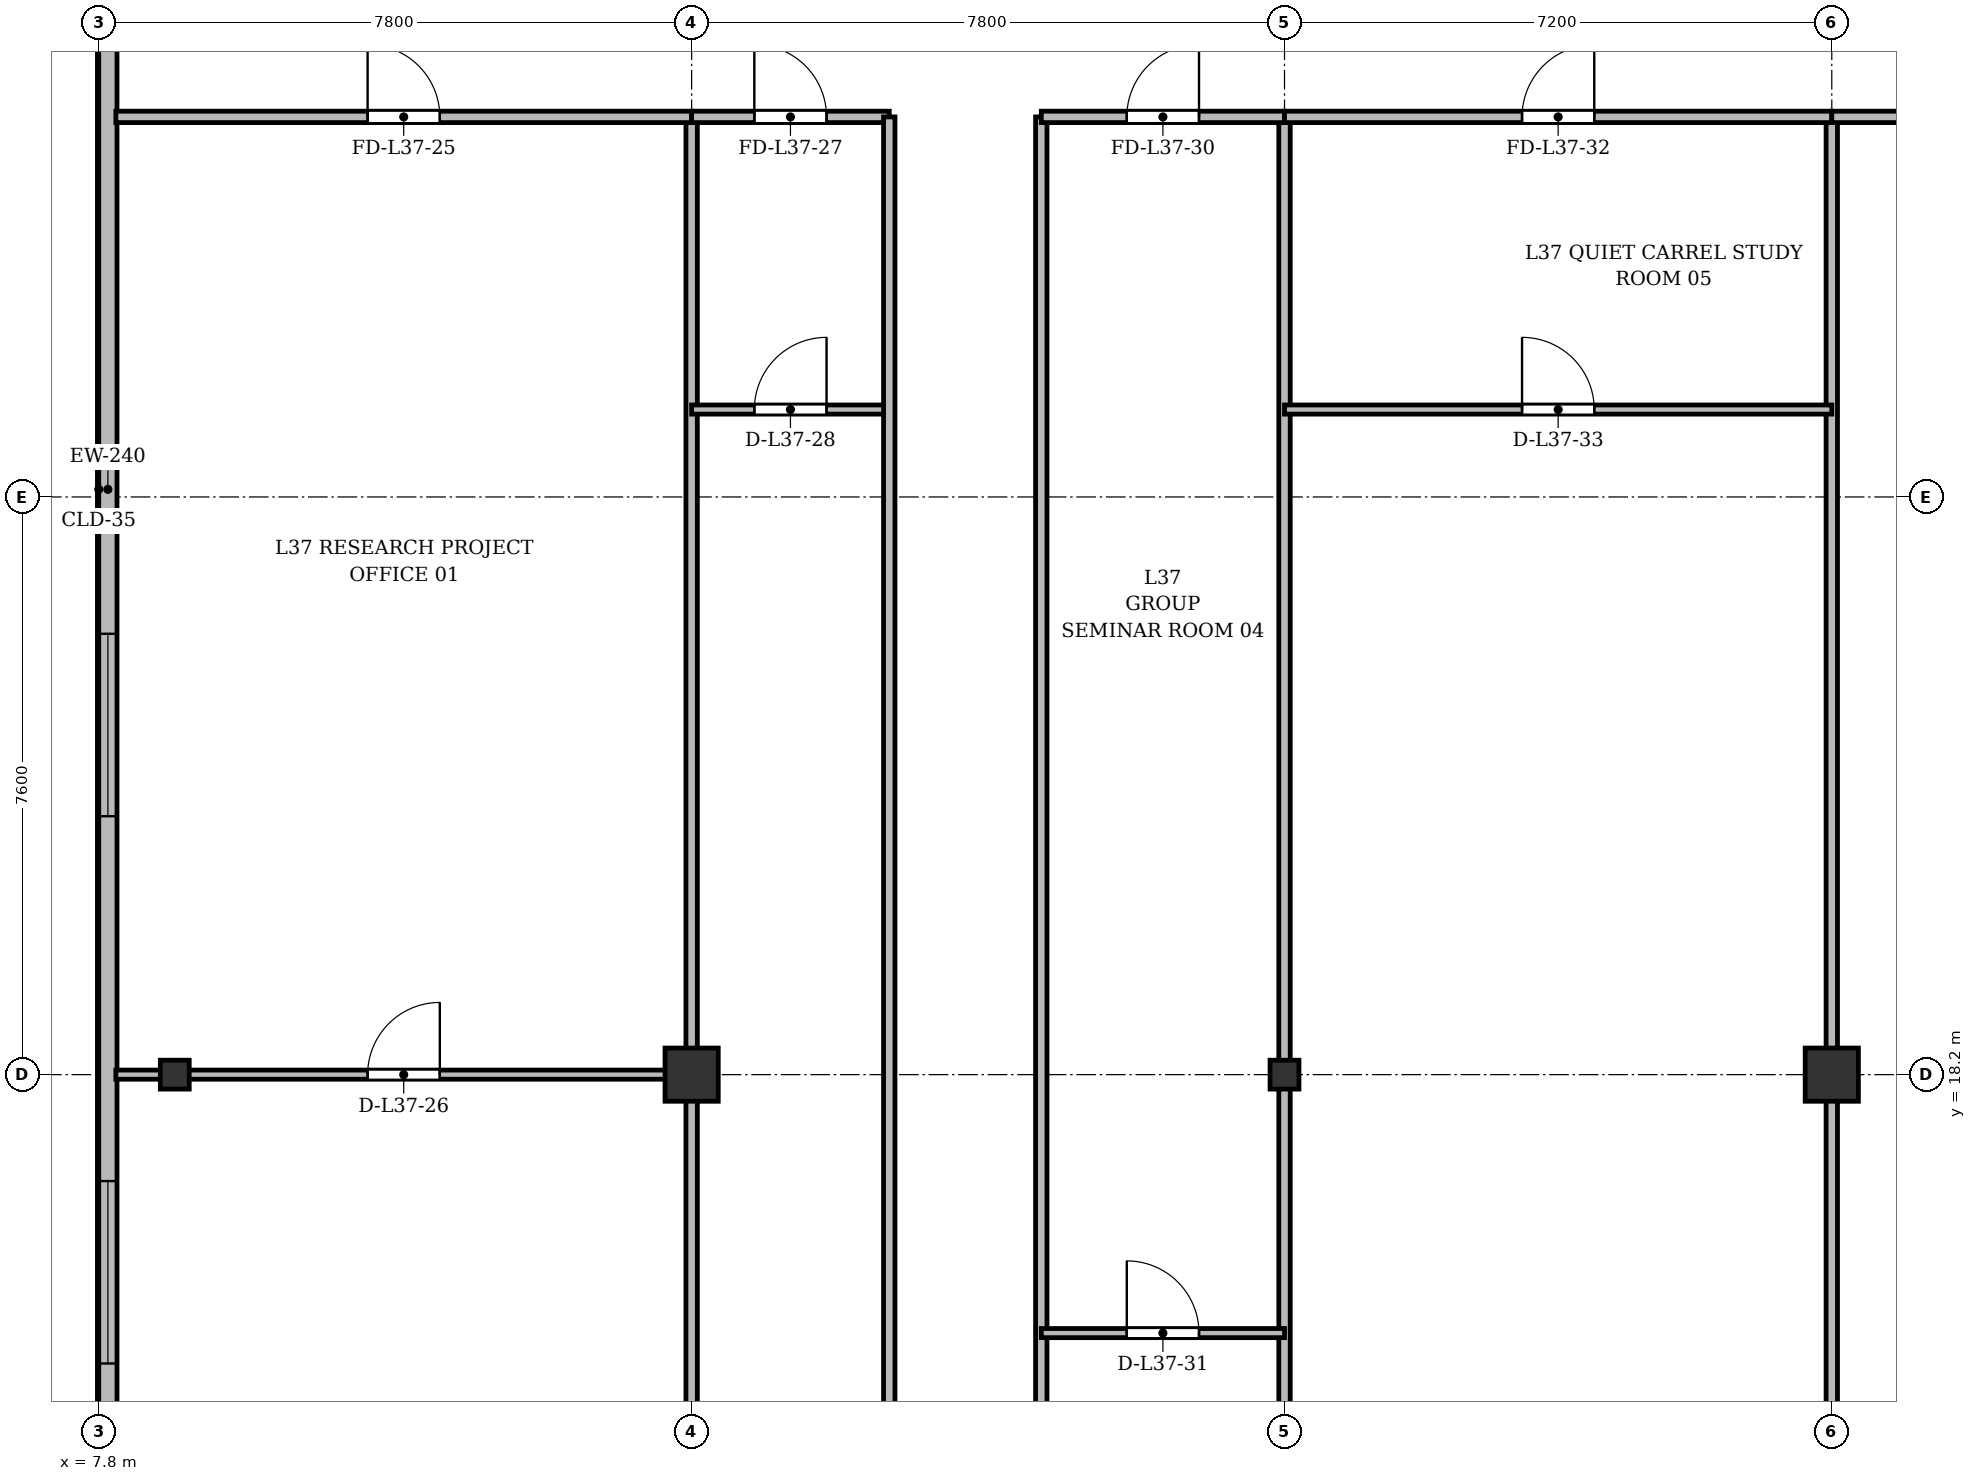
"""IFC4 building model, lengths in metres.
Left out: names, types, materials, properties, quantities, classifications, styles, units other than length and angle.
Written with IfcOpenShell. Run it as: python <this file> out.ifc"""

import sys

from ifc_helpers import new_model, si_unit, direction, frame, frame_2d, origin, origin_2d, place, context, subcontext, project, spatial, rectangle, i_section, extrude, source, transform, mapped, element, fill, save


model = new_model("IFC4")
c1 = context("Model", 3, precision=1e-05, world=origin(), true_north=direction((0.0, 1.0)))
c2 = subcontext(c1, "Body", "Model", "MODEL_VIEW")
j1 = project(units=[si_unit("LENGTHUNIT", "METRE"), si_unit("PLANEANGLEUNIT", "RADIAN")], contexts=[c1])
p1 = place(None, origin())
s1 = spatial("IfcSite", under=j1, at=p1, CompositionType="ELEMENT")
p2 = place(p1, origin())
s2 = spatial("IfcBuilding", under=s1, at=p2, CompositionType="ELEMENT")
p3 = place(p2, frame((0.0, 0.0, 142.9)))
s3 = spatial("IfcBuildingStorey", under=s2, at=p3, CompositionType="ELEMENT", Elevation=142.9)
m1 = source(origin(), c2, "Body", "SweptSolid", [
    extrude(i_section(OverallWidth=0.38, OverallDepth=0.38, WebThickness=0.02, FlangeThickness=0.03, at=origin_2d()), origin(), (0.0, 0.0, 1.0), 3.6),
])
p4 = place(p3, frame((8.8, 18.2, 0.0), z_axis=(0.0, 0.0, 1.0), x_axis=(1.0, 0.0, 0.0)))
e1 = element("IfcColumn", 1, at=p4, inside=s3, PredefinedType="COLUMN", context=c2, shape_type="MappedRepresentation", body=[
    mapped(m1, transform((0.0, 0.0, 0.0), x_axis=(1.0, 0.0, 0.0), y_axis=(0.0, 1.0, 0.0), z_axis=(0.0, 0.0, 1.0), scale=1.0)),
])
m2 = source(origin(), c2, "Body", "SweptSolid", [
    extrude(rectangle(XDim=0.7, YDim=0.7, at=origin_2d()), origin(), (0.0, 0.0, 1.0), 3.6),
])
p5 = place(p3, frame((15.6, 18.2, 0.0), z_axis=(0.0, 0.0, 1.0), x_axis=(1.0, 0.0, 0.0)))
e2 = element("IfcColumn", 2, at=p5, inside=s3, PredefinedType="COLUMN", context=c2, shape_type="MappedRepresentation", body=[
    mapped(m2, transform((0.0, 0.0, 0.0), x_axis=(1.0, 0.0, 0.0), y_axis=(0.0, 1.0, 0.0), z_axis=(0.0, 0.0, 1.0), scale=1.0)),
])
p6 = place(p3, frame((23.4, 18.2, 0.0), z_axis=(0.0, 0.0, 1.0), x_axis=(1.0, 0.0, 0.0)))
e3 = element("IfcColumn", 3, at=p6, inside=s3, PredefinedType="COLUMN", context=c2, shape_type="MappedRepresentation", body=[
    mapped(m1, transform((0.0, 0.0, 0.0), x_axis=(1.0, 0.0, 0.0), y_axis=(0.0, 1.0, 0.0), z_axis=(0.0, 0.0, 1.0), scale=1.0)),
])
p7 = place(p3, frame((30.6, 18.2, 0.0), z_axis=(0.0, 0.0, 1.0), x_axis=(1.0, 0.0, 0.0)))
e4 = element("IfcColumn", 4, at=p7, inside=s3, PredefinedType="COLUMN", context=c2, shape_type="MappedRepresentation", body=[
    mapped(m2, transform((0.0, 0.0, 0.0), x_axis=(1.0, 0.0, 0.0), y_axis=(0.0, 1.0, 0.0), z_axis=(0.0, 0.0, 1.0), scale=1.0)),
])
p8 = place(p3, frame((7.92, 6.3, 0.0), z_axis=(0.0, 0.0, 1.0), x_axis=(0.0, 1.0, 0.0)))
e5 = element("IfcWall", 5, at=p8, inside=s3, PredefinedType="SOLIDWALL", context=c2, shape_type="SweptSolid", body=[
    extrude(rectangle(XDim=39.2, YDim=0.24, at=frame_2d((19.6, 0.0))), origin(), (0.0, 0.0, 1.0), 3.35),
])
p9 = place(p8, frame((1.45, 0.0, 0.92)))
e6 = element("IfcOpeningElement", 6, at=p9, cuts=e5, PredefinedType="OPENING", context=c2, shape_type="SweptSolid", body=[
    extrude(rectangle(XDim=1.2, YDim=1.65, at=frame_2d((0.6, 0.825))), frame((0.0, 0.13, 0.0), z_axis=(0.0, -1.0, 0.0), x_axis=(1.0, 0.0, 0.0)), (0.0, 0.0, 1.0), 0.26),
])
p10 = place(p8, frame((3.9, 0.0, 0.92)))
e7 = element("IfcOpeningElement", 7, at=p10, cuts=e5, PredefinedType="OPENING", context=c2, shape_type="SweptSolid", body=[
    extrude(rectangle(XDim=2.4, YDim=2.1, at=frame_2d((1.2, 1.05))), frame((0.0, 0.13, 0.0), z_axis=(0.0, -1.0, 0.0), x_axis=(1.0, 0.0, 0.0)), (0.0, 0.0, 1.0), 0.26),
])
p11 = place(p8, frame((8.1, 0.0, 0.92)))
e8 = element("IfcOpeningElement", 8, at=p11, cuts=e5, PredefinedType="OPENING", context=c2, shape_type="SweptSolid", body=[
    extrude(rectangle(XDim=2.4, YDim=2.1, at=frame_2d((1.2, 1.05))), frame((0.0, 0.13, 0.0), z_axis=(0.0, -1.0, 0.0), x_axis=(1.0, 0.0, 0.0)), (0.0, 0.0, 1.0), 0.26),
])
p12 = place(p8, frame((15.3, 0.0, 0.92)))
e9 = element("IfcOpeningElement", 9, at=p12, cuts=e5, PredefinedType="OPENING", context=c2, shape_type="SweptSolid", body=[
    extrude(rectangle(XDim=2.4, YDim=2.1, at=frame_2d((1.2, 1.05))), frame((0.0, 0.13, 0.0), z_axis=(0.0, -1.0, 0.0), x_axis=(1.0, 0.0, 0.0)), (0.0, 0.0, 1.0), 0.26),
])
p13 = place(p8, frame((29.3, 0.0, 0.92)))
e10 = element("IfcOpeningElement", 10, at=p13, cuts=e5, PredefinedType="OPENING", context=c2, shape_type="SweptSolid", body=[
    extrude(rectangle(XDim=2.4, YDim=2.1, at=frame_2d((1.2, 1.05))), frame((0.0, 0.13, 0.0), z_axis=(0.0, -1.0, 0.0), x_axis=(1.0, 0.0, 0.0)), (0.0, 0.0, 1.0), 0.26),
])
p14 = place(p8, frame((33.5, 0.0, 0.92)))
e11 = element("IfcOpeningElement", 11, at=p14, cuts=e5, PredefinedType="OPENING", context=c2, shape_type="SweptSolid", body=[
    extrude(rectangle(XDim=1.2, YDim=1.65, at=frame_2d((0.6, 0.825))), frame((0.0, 0.13, 0.0), z_axis=(0.0, -1.0, 0.0), x_axis=(1.0, 0.0, 0.0)), (0.0, 0.0, 1.0), 0.26),
])
p15 = place(p8, frame((36.85, 0.0, 0.92)))
e12 = element("IfcOpeningElement", 12, at=p15, cuts=e5, PredefinedType="OPENING", context=c2, shape_type="SweptSolid", body=[
    extrude(rectangle(XDim=1.2, YDim=1.65, at=frame_2d((0.6, 0.825))), frame((0.0, 0.13, 0.0), z_axis=(0.0, -1.0, 0.0), x_axis=(1.0, 0.0, 0.0)), (0.0, 0.0, 1.0), 0.26),
])
for number, where, z_axis, x_axis in (
    (13, (15.6, 3.525, 0.0), (0.0, 0.0, 1.0), (0.0, 1.0, 0.0)),
    (14, (23.4, 3.525, 0.0), (0.0, 0.0, 1.0), (0.0, 1.0, 0.0)),
    (15, (30.6, 3.525, 0.0), (0.0, 0.0, 1.0), (0.0, 1.0, 0.0)),
):
    element("IfcWall", number, at=place(p3, frame(where, z_axis=z_axis, x_axis=x_axis)), inside=s3, PredefinedType="PARTITIONING", context=c2, shape_type="SweptSolid", body=[
        extrude(rectangle(XDim=27.275, YDim=0.15, at=frame_2d((13.638, 0.0))), origin(), (0.0, 0.0, 1.0), 2.85),
    ])
p16 = place(p3, frame((8.025, 30.8, 0.0), z_axis=(0.0, 0.0, 1.0), x_axis=(1.0, 0.0, 0.0)))
e16 = element("IfcWall", 16, at=p16, inside=s3, PredefinedType="PARTITIONING", context=c2, shape_type="SweptSolid", body=[
    extrude(rectangle(XDim=7.575, YDim=0.15, at=frame_2d((3.788, 0.0))), origin(), (0.0, 0.0, 1.0), 2.85),
])
p17 = place(p16, frame((3.312, 0.0, 0.0)))
e17 = element("IfcOpeningElement", 17, at=p17, cuts=e16, PredefinedType="OPENING", context=c2, shape_type="SweptSolid", body=[
    extrude(rectangle(XDim=0.95, YDim=2.15, at=frame_2d((0.475, 1.075))), frame((0.0, 0.085, 0.0), z_axis=(0.0, -1.0, 0.0), x_axis=(1.0, 0.0, 0.0)), (0.0, 0.0, 1.0), 0.17),
])
p18 = place(p3, frame((8.025, 18.2, 0.0), z_axis=(0.0, 0.0, 1.0), x_axis=(1.0, 0.0, 0.0)))
e18 = element("IfcWall", 18, at=p18, inside=s3, PredefinedType="PARTITIONING", context=c2, shape_type="SweptSolid", body=[
    extrude(rectangle(XDim=7.575, YDim=0.12, at=frame_2d((3.788, 0.0))), origin(), (0.0, 0.0, 1.0), 2.75),
])
p19 = place(p18, frame((3.312, 0.0, 0.0)))
e19 = element("IfcOpeningElement", 19, at=p19, cuts=e18, PredefinedType="OPENING", context=c2, shape_type="SweptSolid", body=[
    extrude(rectangle(XDim=0.95, YDim=2.15, at=frame_2d((0.475, 1.075))), frame((0.0, 0.07, 0.0), z_axis=(0.0, -1.0, 0.0), x_axis=(1.0, 0.0, 0.0)), (0.0, 0.0, 1.0), 0.14),
])
p20 = place(p3, frame((15.6, 30.8, 0.0), z_axis=(0.0, 0.0, 1.0), x_axis=(1.0, 0.0, 0.0)))
e20 = element("IfcWall", 20, at=p20, inside=s3, PredefinedType="PARTITIONING", context=c2, shape_type="SweptSolid", body=[
    extrude(rectangle(XDim=2.6, YDim=0.15, at=frame_2d((1.3, 0.0))), origin(), (0.0, 0.0, 1.0), 2.85),
])
p21 = place(p20, frame((0.825, 0.0, 0.0)))
e21 = element("IfcOpeningElement", 21, at=p21, cuts=e20, PredefinedType="OPENING", context=c2, shape_type="SweptSolid", body=[
    extrude(rectangle(XDim=0.95, YDim=2.15, at=frame_2d((0.475, 1.075))), frame((0.0, 0.085, 0.0), z_axis=(0.0, -1.0, 0.0), x_axis=(1.0, 0.0, 0.0)), (0.0, 0.0, 1.0), 0.17),
])
p22 = place(p3, frame((15.6, 26.95, 0.0), z_axis=(0.0, 0.0, 1.0), x_axis=(1.0, 0.0, 0.0)))
e22 = element("IfcWall", 22, at=p22, inside=s3, PredefinedType="PARTITIONING", context=c2, shape_type="SweptSolid", body=[
    extrude(rectangle(XDim=2.6, YDim=0.12, at=frame_2d((1.3, 0.0))), origin(), (0.0, 0.0, 1.0), 2.85),
])
p23 = place(p22, frame((0.825, 0.0, 0.0)))
e23 = element("IfcOpeningElement", 23, at=p23, cuts=e22, PredefinedType="OPENING", context=c2, shape_type="SweptSolid", body=[
    extrude(rectangle(XDim=0.95, YDim=2.15, at=frame_2d((0.475, 1.075))), frame((0.0, 0.07, 0.0), z_axis=(0.0, -1.0, 0.0), x_axis=(1.0, 0.0, 0.0)), (0.0, 0.0, 1.0), 0.14),
])
for number, where, z_axis, x_axis in (
    (24, (18.2, 3.525, 0.0), (0.0, 0.0, 1.0), (0.0, 1.0, 0.0)),
    (25, (20.2, 3.525, 0.0), (0.0, 0.0, 1.0), (0.0, 1.0, 0.0)),
):
    element("IfcWall", number, at=place(p3, frame(where, z_axis=z_axis, x_axis=x_axis)), inside=s3, PredefinedType="PARTITIONING", context=c2, shape_type="SweptSolid", body=[
        extrude(rectangle(XDim=27.275, YDim=0.15, at=frame_2d((13.638, 0.0))), origin(), (0.0, 0.0, 1.0), 2.75),
    ])
p24 = place(p3, frame((20.2, 30.8, 0.0), z_axis=(0.0, 0.0, 1.0), x_axis=(1.0, 0.0, 0.0)))
e26 = element("IfcWall", 26, at=p24, inside=s3, PredefinedType="PARTITIONING", context=c2, shape_type="SweptSolid", body=[
    extrude(rectangle(XDim=3.2, YDim=0.15, at=frame_2d((1.6, 0.0))), origin(), (0.0, 0.0, 1.0), 2.85),
])
p25 = place(p24, frame((1.125, 0.0, 0.0)))
e27 = element("IfcOpeningElement", 27, at=p25, cuts=e26, PredefinedType="OPENING", context=c2, shape_type="SweptSolid", body=[
    extrude(rectangle(XDim=0.95, YDim=2.15, at=frame_2d((0.475, 1.075))), frame((0.0, 0.085, 0.0), z_axis=(0.0, -1.0, 0.0), x_axis=(1.0, 0.0, 0.0)), (0.0, 0.0, 1.0), 0.17),
])
p26 = place(p3, frame((20.2, 14.8, 0.0), z_axis=(0.0, 0.0, 1.0), x_axis=(1.0, 0.0, 0.0)))
e28 = element("IfcWall", 28, at=p26, inside=s3, PredefinedType="PARTITIONING", context=c2, shape_type="SweptSolid", body=[
    extrude(rectangle(XDim=3.2, YDim=0.12, at=frame_2d((1.6, 0.0))), origin(), (0.0, 0.0, 1.0), 2.85),
])
p27 = place(p26, frame((1.125, 0.0, 0.0)))
e29 = element("IfcOpeningElement", 29, at=p27, cuts=e28, PredefinedType="OPENING", context=c2, shape_type="SweptSolid", body=[
    extrude(rectangle(XDim=0.95, YDim=2.15, at=frame_2d((0.475, 1.075))), frame((0.0, 0.07, 0.0), z_axis=(0.0, -1.0, 0.0), x_axis=(1.0, 0.0, 0.0)), (0.0, 0.0, 1.0), 0.14),
])
p28 = place(p3, frame((23.4, 30.8, 0.0), z_axis=(0.0, 0.0, 1.0), x_axis=(1.0, 0.0, 0.0)))
e30 = element("IfcWall", 30, at=p28, inside=s3, PredefinedType="PARTITIONING", context=c2, shape_type="SweptSolid", body=[
    extrude(rectangle(XDim=7.2, YDim=0.15, at=frame_2d((3.6, 0.0))), origin(), (0.0, 0.0, 1.0), 2.85),
])
p29 = place(p28, frame((3.125, 0.0, 0.0)))
e31 = element("IfcOpeningElement", 31, at=p29, cuts=e30, PredefinedType="OPENING", context=c2, shape_type="SweptSolid", body=[
    extrude(rectangle(XDim=0.95, YDim=2.15, at=frame_2d((0.475, 1.075))), frame((0.0, 0.085, 0.0), z_axis=(0.0, -1.0, 0.0), x_axis=(1.0, 0.0, 0.0)), (0.0, 0.0, 1.0), 0.17),
])
p30 = place(p3, frame((23.4, 26.95, 0.0), z_axis=(0.0, 0.0, 1.0), x_axis=(1.0, 0.0, 0.0)))
e32 = element("IfcWall", 32, at=p30, inside=s3, PredefinedType="PARTITIONING", context=c2, shape_type="SweptSolid", body=[
    extrude(rectangle(XDim=7.2, YDim=0.12, at=frame_2d((3.6, 0.0))), origin(), (0.0, 0.0, 1.0), 2.85),
])
p31 = place(p30, frame((3.125, 0.0, 0.0)))
e33 = element("IfcOpeningElement", 33, at=p31, cuts=e32, PredefinedType="OPENING", context=c2, shape_type="SweptSolid", body=[
    extrude(rectangle(XDim=0.95, YDim=2.15, at=frame_2d((0.475, 1.075))), frame((0.0, 0.07, 0.0), z_axis=(0.0, -1.0, 0.0), x_axis=(1.0, 0.0, 0.0)), (0.0, 0.0, 1.0), 0.14),
])
p32 = place(p3, frame((30.6, 30.8, 0.0), z_axis=(0.0, 0.0, 1.0), x_axis=(1.0, 0.0, 0.0)))
e34 = element("IfcWall", 34, at=p32, inside=s3, PredefinedType="PARTITIONING", context=c2, shape_type="SweptSolid", body=[
    extrude(rectangle(XDim=13.2, YDim=0.15, at=frame_2d((6.6, 0.0))), origin(), (0.0, 0.0, 1.0), 2.85),
])
p33 = place(p32, frame((5.8, 0.0, 0.0)))
e35 = element("IfcOpeningElement", 35, at=p33, cuts=e34, PredefinedType="OPENING", context=c2, shape_type="SweptSolid", body=[
    extrude(rectangle(XDim=1.6, YDim=2.2, at=frame_2d((0.8, 1.1))), frame((0.0, 0.085, 0.0), z_axis=(0.0, -1.0, 0.0), x_axis=(1.0, 0.0, 0.0)), (0.0, 0.0, 1.0), 0.17),
])
m3 = source(origin(), c2, "Body", "SweptSolid", [
    extrude(rectangle(XDim=2.4, YDim=2.1, at=frame_2d((1.2, 1.05))), frame((0.0, 0.03, 0.0), z_axis=(0.0, -1.0, 0.0), x_axis=(1.0, 0.0, 0.0)), (0.0, 0.0, 1.0), 0.06),
])
p34 = place(p11, origin())
e36 = element("IfcWindow", 36, at=p34, inside=s3, PartitioningType="SINGLE_PANEL", PredefinedType="WINDOW", context=c2, shape_type="MappedRepresentation", body=[
    mapped(m3, transform((0.0, 0.0, 0.0), x_axis=(1.0, 0.0, 0.0), y_axis=(0.0, 1.0, 0.0), z_axis=(0.0, 0.0, 1.0), scale=1.0)),
])
fill(e8, e36)
p35 = place(p12, origin())
e37 = element("IfcWindow", 37, at=p35, inside=s3, PartitioningType="SINGLE_PANEL", PredefinedType="WINDOW", context=c2, shape_type="MappedRepresentation", body=[
    mapped(m3, transform((0.0, 0.0, 0.0), x_axis=(1.0, 0.0, 0.0), y_axis=(0.0, 1.0, 0.0), z_axis=(0.0, 0.0, 1.0), scale=1.0)),
])
fill(e9, e37)
m4 = source(origin(), c2, "Body", "SweptSolid", [
    extrude(rectangle(XDim=0.95, YDim=2.15, at=frame_2d((0.475, 1.075))), frame((0.0, 0.025, 0.0), z_axis=(0.0, -1.0, 0.0), x_axis=(1.0, 0.0, 0.0)), (0.0, 0.0, 1.0), 0.05),
])
p36 = place(p17, origin())
e38 = element("IfcDoor", 38, at=p36, inside=s3, OperationType="SINGLE_SWING_LEFT", PredefinedType="DOOR", context=c2, shape_type="MappedRepresentation", body=[
    mapped(m4, transform((0.0, 0.0, 0.0), x_axis=(1.0, 0.0, 0.0), y_axis=(0.0, 1.0, 0.0), z_axis=(0.0, 0.0, 1.0), scale=1.0)),
])
fill(e17, e38)
p37 = place(p19, origin())
e39 = element("IfcDoor", 39, at=p37, inside=s3, OperationType="SINGLE_SWING_RIGHT", PredefinedType="DOOR", context=c2, shape_type="MappedRepresentation", body=[
    mapped(m4, transform((0.0, 0.0, 0.0), x_axis=(1.0, 0.0, 0.0), y_axis=(0.0, 1.0, 0.0), z_axis=(0.0, 0.0, 1.0), scale=1.0)),
])
fill(e19, e39)
p38 = place(p21, origin())
e40 = element("IfcDoor", 40, at=p38, inside=s3, OperationType="SINGLE_SWING_LEFT", PredefinedType="DOOR", context=c2, shape_type="MappedRepresentation", body=[
    mapped(m4, transform((0.0, 0.0, 0.0), x_axis=(1.0, 0.0, 0.0), y_axis=(0.0, 1.0, 0.0), z_axis=(0.0, 0.0, 1.0), scale=1.0)),
])
fill(e21, e40)
p39 = place(p23, origin())
e41 = element("IfcDoor", 41, at=p39, inside=s3, OperationType="SINGLE_SWING_RIGHT", PredefinedType="DOOR", context=c2, shape_type="MappedRepresentation", body=[
    mapped(m4, transform((0.0, 0.0, 0.0), x_axis=(1.0, 0.0, 0.0), y_axis=(0.0, 1.0, 0.0), z_axis=(0.0, 0.0, 1.0), scale=1.0)),
])
fill(e23, e41)
p40 = place(p25, origin())
e42 = element("IfcDoor", 42, at=p40, inside=s3, OperationType="SINGLE_SWING_RIGHT", PredefinedType="DOOR", context=c2, shape_type="MappedRepresentation", body=[
    mapped(m4, transform((0.0, 0.0, 0.0), x_axis=(1.0, 0.0, 0.0), y_axis=(0.0, 1.0, 0.0), z_axis=(0.0, 0.0, 1.0), scale=1.0)),
])
fill(e27, e42)
p41 = place(p27, origin())
e43 = element("IfcDoor", 43, at=p41, inside=s3, OperationType="SINGLE_SWING_LEFT", PredefinedType="DOOR", context=c2, shape_type="MappedRepresentation", body=[
    mapped(m4, transform((0.0, 0.0, 0.0), x_axis=(1.0, 0.0, 0.0), y_axis=(0.0, 1.0, 0.0), z_axis=(0.0, 0.0, 1.0), scale=1.0)),
])
fill(e29, e43)
p42 = place(p29, origin())
e44 = element("IfcDoor", 44, at=p42, inside=s3, OperationType="SINGLE_SWING_RIGHT", PredefinedType="DOOR", context=c2, shape_type="MappedRepresentation", body=[
    mapped(m4, transform((0.0, 0.0, 0.0), x_axis=(1.0, 0.0, 0.0), y_axis=(0.0, 1.0, 0.0), z_axis=(0.0, 0.0, 1.0), scale=1.0)),
])
fill(e31, e44)
p43 = place(p31, origin())
e45 = element("IfcDoor", 45, at=p43, inside=s3, OperationType="SINGLE_SWING_LEFT", PredefinedType="DOOR", context=c2, shape_type="MappedRepresentation", body=[
    mapped(m4, transform((0.0, 0.0, 0.0), x_axis=(1.0, 0.0, 0.0), y_axis=(0.0, 1.0, 0.0), z_axis=(0.0, 0.0, 1.0), scale=1.0)),
])
fill(e33, e45)
save(model, sys.argv[1])
